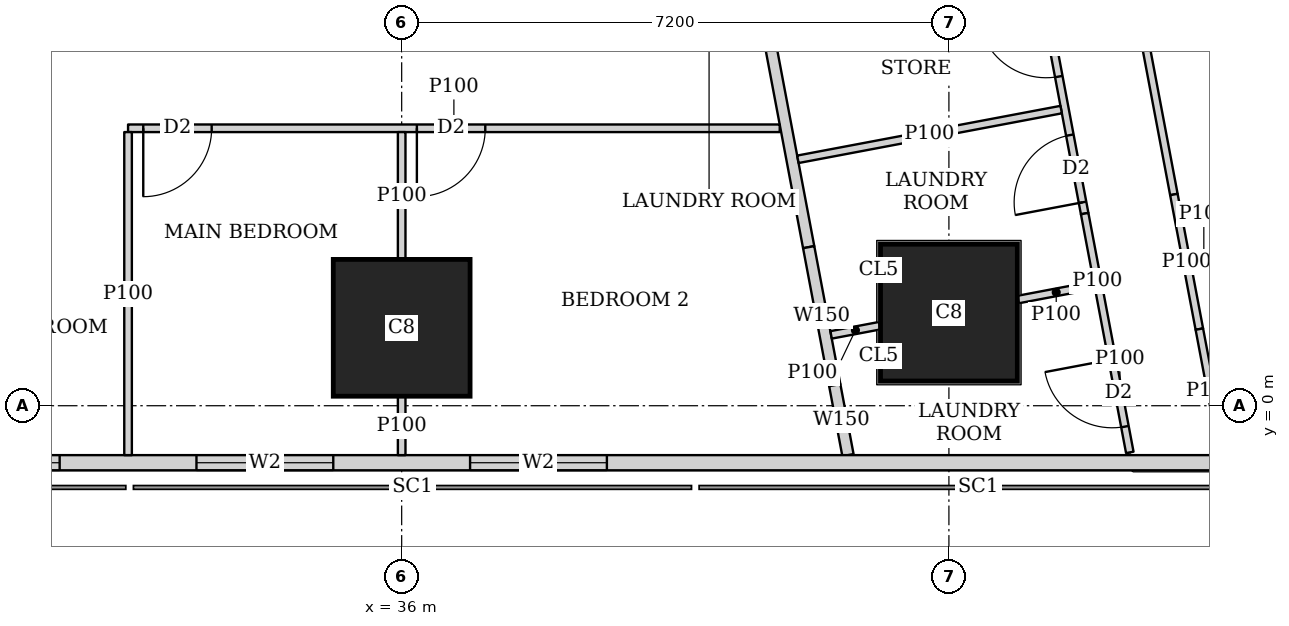
"""IFC4 building model, lengths in metres.
Left out: names, types, materials, properties, quantities, classifications, styles, units other than length and angle.
Written with IfcOpenShell. Run it as: python <this file> out.ifc"""

import sys

from ifc_helpers import new_model, si_unit, direction, frame, frame_2d, origin, origin_2d, place, context, subcontext, project, spatial, rectangle, extrude, element, fill, save


model = new_model("IFC4")
c1 = context("Model", 3, precision=1e-05, world=origin(), true_north=direction((0.0, 1.0)))
c2 = subcontext(c1, "Body", "Model", "MODEL_VIEW")
j1 = project(units=[si_unit("LENGTHUNIT", "METRE"), si_unit("PLANEANGLEUNIT", "RADIAN")], contexts=[c1])
p1 = place(None, origin())
s1 = spatial("IfcSite", under=j1, at=p1, CompositionType="ELEMENT")
p2 = place(p1, origin())
s2 = spatial("IfcBuilding", under=s1, at=p2, CompositionType="ELEMENT")
p3 = place(p2, frame((0.0, 0.0, 184.55)))
s3 = spatial("IfcBuildingStorey", under=s2, at=p3, CompositionType="ELEMENT", Elevation=184.55)
for number, where, z_axis, x_axis in (
    (1, (36.0, 1.025, 0.0), (0.0, 0.0, 1.0), (1.0, 0.0, 0.0)),
    (2, (43.2, 1.225, 0.0), (0.0, 0.0, 1.0), (1.0, 0.0, 0.0)),
):
    element("IfcColumn", number, at=place(p3, frame(where, z_axis=z_axis, x_axis=x_axis)), inside=s3, PredefinedType="COLUMN", context=c2, shape_type="SweptSolid", body=[
        extrude(rectangle(XDim=1.8, YDim=1.8, at=origin_2d()), origin(), (0.0, 0.0, 1.0), 3.75),
    ])
p4 = place(p3, frame((2.163, -0.75, 0.0), z_axis=(0.0, 0.0, 1.0), x_axis=(1.0, 0.0, 0.0)))
e3 = element("IfcWall", 3, at=p4, inside=s3, PredefinedType="SOLIDWALL", context=c2, shape_type="SweptSolid", body=[
    extrude(rectangle(XDim=45.628, YDim=0.2, at=frame_2d((22.814, 0.0))), origin(), (0.0, 0.0, 1.0), 3.45),
])
p5 = place(p4, frame((9.537, 0.0, 0.9)))
e4 = element("IfcOpeningElement", 4, at=p5, cuts=e3, PredefinedType="OPENING", context=c2, shape_type="SweptSolid", body=[
    extrude(rectangle(XDim=1.8, YDim=1.5, at=frame_2d((0.9, 0.75))), frame((0.0, 0.11, 0.0), z_axis=(0.0, -1.0, 0.0), x_axis=(1.0, 0.0, 0.0)), (0.0, 0.0, 1.0), 0.22),
])
p6 = place(p4, frame((13.137, 0.0, 0.9)))
e5 = element("IfcOpeningElement", 5, at=p6, cuts=e3, PredefinedType="OPENING", context=c2, shape_type="SweptSolid", body=[
    extrude(rectangle(XDim=1.8, YDim=1.5, at=frame_2d((0.9, 0.75))), frame((0.0, 0.11, 0.0), z_axis=(0.0, -1.0, 0.0), x_axis=(1.0, 0.0, 0.0)), (0.0, 0.0, 1.0), 0.22),
])
p7 = place(p4, frame((16.737, 0.0, 0.9)))
e6 = element("IfcOpeningElement", 6, at=p7, cuts=e3, PredefinedType="OPENING", context=c2, shape_type="SweptSolid", body=[
    extrude(rectangle(XDim=1.8, YDim=1.5, at=frame_2d((0.9, 0.75))), frame((0.0, 0.11, 0.0), z_axis=(0.0, -1.0, 0.0), x_axis=(1.0, 0.0, 0.0)), (0.0, 0.0, 1.0), 0.22),
])
p8 = place(p4, frame((20.337, 0.0, 0.9)))
e7 = element("IfcOpeningElement", 7, at=p8, cuts=e3, PredefinedType="OPENING", context=c2, shape_type="SweptSolid", body=[
    extrude(rectangle(XDim=1.8, YDim=1.5, at=frame_2d((0.9, 0.75))), frame((0.0, 0.11, 0.0), z_axis=(0.0, -1.0, 0.0), x_axis=(1.0, 0.0, 0.0)), (0.0, 0.0, 1.0), 0.22),
])
p9 = place(p4, frame((23.937, 0.0, 0.9)))
e8 = element("IfcOpeningElement", 8, at=p9, cuts=e3, PredefinedType="OPENING", context=c2, shape_type="SweptSolid", body=[
    extrude(rectangle(XDim=1.8, YDim=1.5, at=frame_2d((0.9, 0.75))), frame((0.0, 0.11, 0.0), z_axis=(0.0, -1.0, 0.0), x_axis=(1.0, 0.0, 0.0)), (0.0, 0.0, 1.0), 0.22),
])
p10 = place(p4, frame((27.537, 0.0, 0.9)))
e9 = element("IfcOpeningElement", 9, at=p10, cuts=e3, PredefinedType="OPENING", context=c2, shape_type="SweptSolid", body=[
    extrude(rectangle(XDim=1.8, YDim=1.5, at=frame_2d((0.9, 0.75))), frame((0.0, 0.11, 0.0), z_axis=(0.0, -1.0, 0.0), x_axis=(1.0, 0.0, 0.0)), (0.0, 0.0, 1.0), 0.22),
])
p11 = place(p4, frame((31.137, 0.0, 0.9)))
e10 = element("IfcOpeningElement", 10, at=p11, cuts=e3, PredefinedType="OPENING", context=c2, shape_type="SweptSolid", body=[
    extrude(rectangle(XDim=1.8, YDim=1.5, at=frame_2d((0.9, 0.75))), frame((0.0, 0.11, 0.0), z_axis=(0.0, -1.0, 0.0), x_axis=(1.0, 0.0, 0.0)), (0.0, 0.0, 1.0), 0.22),
])
p12 = place(p4, frame((34.737, 0.0, 0.9)))
e11 = element("IfcOpeningElement", 11, at=p12, cuts=e3, PredefinedType="OPENING", context=c2, shape_type="SweptSolid", body=[
    extrude(rectangle(XDim=1.8, YDim=1.5, at=frame_2d((0.9, 0.75))), frame((0.0, 0.11, 0.0), z_axis=(0.0, -1.0, 0.0), x_axis=(1.0, 0.0, 0.0)), (0.0, 0.0, 1.0), 0.22),
])
p13 = place(p3, frame((50.653, 2.703, 0.0), z_axis=(0.0, 0.0, 1.0), x_axis=(-0.185612026696, 0.982623109613, 0.0)))
e12 = element("IfcWall", 12, at=p13, inside=s3, PredefinedType="SOLIDWALL", context=c2, shape_type="SweptSolid", body=[
    extrude(rectangle(XDim=41.393, YDim=0.2, at=frame_2d((20.697, 0.0))), origin(), (0.0, 0.0, 1.0), 3.45),
])
p14 = place(p13, frame((1.633, 0.0, 0.9)))
e13 = element("IfcOpeningElement", 13, at=p14, cuts=e12, PredefinedType="OPENING", context=c2, shape_type="SweptSolid", body=[
    extrude(rectangle(XDim=1.8, YDim=1.5, at=frame_2d((0.9, 0.75))), frame((0.0, 0.11, 0.0), z_axis=(0.0, -1.0, 0.0), x_axis=(1.0, 0.0, 0.0)), (0.0, 0.0, 1.0), 0.22),
])
p15 = place(p13, frame((6.032, 0.0, 0.9)))
e14 = element("IfcOpeningElement", 14, at=p15, cuts=e12, PredefinedType="OPENING", context=c2, shape_type="SweptSolid", body=[
    extrude(rectangle(XDim=1.8, YDim=1.5, at=frame_2d((0.9, 0.75))), frame((0.0, 0.11, 0.0), z_axis=(0.0, -1.0, 0.0), x_axis=(1.0, 0.0, 0.0)), (0.0, 0.0, 1.0), 0.22),
])
p16 = place(p13, frame((9.848, 0.0, 0.9)))
e15 = element("IfcOpeningElement", 15, at=p16, cuts=e12, PredefinedType="OPENING", context=c2, shape_type="SweptSolid", body=[
    extrude(rectangle(XDim=1.8, YDim=1.5, at=frame_2d((0.9, 0.75))), frame((0.0, 0.11, 0.0), z_axis=(0.0, -1.0, 0.0), x_axis=(1.0, 0.0, 0.0)), (0.0, 0.0, 1.0), 0.22),
])
p17 = place(p13, frame((13.664, 0.0, 0.9)))
e16 = element("IfcOpeningElement", 16, at=p17, cuts=e12, PredefinedType="OPENING", context=c2, shape_type="SweptSolid", body=[
    extrude(rectangle(XDim=1.8, YDim=1.5, at=frame_2d((0.9, 0.75))), frame((0.0, 0.11, 0.0), z_axis=(0.0, -1.0, 0.0), x_axis=(1.0, 0.0, 0.0)), (0.0, 0.0, 1.0), 0.22),
])
p18 = place(p13, frame((17.481, 0.0, 0.9)))
e17 = element("IfcOpeningElement", 17, at=p18, cuts=e12, PredefinedType="OPENING", context=c2, shape_type="SweptSolid", body=[
    extrude(rectangle(XDim=1.8, YDim=1.5, at=frame_2d((0.9, 0.75))), frame((0.0, 0.11, 0.0), z_axis=(0.0, -1.0, 0.0), x_axis=(1.0, 0.0, 0.0)), (0.0, 0.0, 1.0), 0.22),
])
p19 = place(p13, frame((21.297, 0.0, 0.9)))
e18 = element("IfcOpeningElement", 18, at=p19, cuts=e12, PredefinedType="OPENING", context=c2, shape_type="SweptSolid", body=[
    extrude(rectangle(XDim=1.8, YDim=1.5, at=frame_2d((0.9, 0.75))), frame((0.0, 0.11, 0.0), z_axis=(0.0, -1.0, 0.0), x_axis=(1.0, 0.0, 0.0)), (0.0, 0.0, 1.0), 0.22),
])
p20 = place(p13, frame((25.113, 0.0, 0.9)))
e19 = element("IfcOpeningElement", 19, at=p20, cuts=e12, PredefinedType="OPENING", context=c2, shape_type="SweptSolid", body=[
    extrude(rectangle(XDim=1.8, YDim=1.5, at=frame_2d((0.9, 0.75))), frame((0.0, 0.11, 0.0), z_axis=(0.0, -1.0, 0.0), x_axis=(1.0, 0.0, 0.0)), (0.0, 0.0, 1.0), 0.22),
])
p21 = place(p13, frame((28.93, 0.0, 0.9)))
e20 = element("IfcOpeningElement", 20, at=p21, cuts=e12, PredefinedType="OPENING", context=c2, shape_type="SweptSolid", body=[
    extrude(rectangle(XDim=1.8, YDim=1.5, at=frame_2d((0.9, 0.75))), frame((0.0, 0.11, 0.0), z_axis=(0.0, -1.0, 0.0), x_axis=(1.0, 0.0, 0.0)), (0.0, 0.0, 1.0), 0.22),
])
p22 = place(p13, frame((32.746, 0.0, 0.9)))
e21 = element("IfcOpeningElement", 21, at=p22, cuts=e12, PredefinedType="OPENING", context=c2, shape_type="SweptSolid", body=[
    extrude(rectangle(XDim=1.8, YDim=1.5, at=frame_2d((0.9, 0.75))), frame((0.0, 0.11, 0.0), z_axis=(0.0, -1.0, 0.0), x_axis=(1.0, 0.0, 0.0)), (0.0, 0.0, 1.0), 0.22),
])
p23 = place(p13, frame((36.481, 0.0, 0.9)))
e22 = element("IfcOpeningElement", 22, at=p23, cuts=e12, PredefinedType="OPENING", context=c2, shape_type="SweptSolid", body=[
    extrude(rectangle(XDim=1.8, YDim=1.5, at=frame_2d((0.9, 0.75))), frame((0.0, 0.11, 0.0), z_axis=(0.0, -1.0, 0.0), x_axis=(1.0, 0.0, 0.0)), (0.0, 0.0, 1.0), 0.22),
])
p24 = place(p3, frame((33.623, 43.022, 0.0), z_axis=(0.0, 0.0, 1.0), x_axis=(0.185596841028, -0.98262597798, 0.0)))
e23 = element("IfcWall", 23, at=p24, inside=s3, PredefinedType="SOLIDWALL", context=c2, shape_type="SweptSolid", body=[
    extrude(rectangle(XDim=41.66, YDim=0.15, at=frame_2d((20.83, 0.0))), origin(), (0.0, 0.0, 1.0), 2.45),
])
p25 = place(p24, frame((8.034, 0.0, 0.0)))
e24 = element("IfcOpeningElement", 24, at=p25, cuts=e23, PredefinedType="OPENING", context=c2, shape_type="SweptSolid", body=[
    extrude(rectangle(XDim=1.0, YDim=2.1, at=frame_2d((0.5, 1.05))), frame((0.0, 0.085, 0.0), z_axis=(0.0, -1.0, 0.0), x_axis=(1.0, 0.0, 0.0)), (0.0, 0.0, 1.0), 0.17),
])
p26 = place(p24, frame((12.611, 0.0, 0.0)))
e25 = element("IfcOpeningElement", 25, at=p26, cuts=e23, PredefinedType="OPENING", context=c2, shape_type="SweptSolid", body=[
    extrude(rectangle(XDim=1.0, YDim=2.1, at=frame_2d((0.5, 1.05))), frame((0.0, 0.085, 0.0), z_axis=(0.0, -1.0, 0.0), x_axis=(1.0, 0.0, 0.0)), (0.0, 0.0, 1.0), 0.17),
])
p27 = place(p24, frame((20.242, 0.0, 0.0)))
e26 = element("IfcOpeningElement", 26, at=p27, cuts=e23, PredefinedType="OPENING", context=c2, shape_type="SweptSolid", body=[
    extrude(rectangle(XDim=1.0, YDim=2.1, at=frame_2d((0.5, 1.05))), frame((0.0, 0.085, 0.0), z_axis=(0.0, -1.0, 0.0), x_axis=(1.0, 0.0, 0.0)), (0.0, 0.0, 1.0), 0.17),
])
p28 = place(p24, frame((31.206, 0.0, 0.0)))
e27 = element("IfcOpeningElement", 27, at=p28, cuts=e23, PredefinedType="OPENING", context=c2, shape_type="SweptSolid", body=[
    extrude(rectangle(XDim=1.0, YDim=2.1, at=frame_2d((0.5, 1.05))), frame((0.0, 0.085, 0.0), z_axis=(0.0, -1.0, 0.0), x_axis=(1.0, 0.0, 0.0)), (0.0, 0.0, 1.0), 0.17),
])
p29 = place(p3, frame((41.355, 2.086, 0.0), z_axis=(0.0, 0.0, 1.0), x_axis=(0.185708872674, -0.982604811005, 0.0)))
e28 = element("IfcWall", 28, at=p29, inside=s3, PredefinedType="SOLIDWALL", context=c2, shape_type="SweptSolid", body=[
    extrude(rectangle(XDim=1.847, YDim=0.15, at=frame_2d((0.924, 0.0))), origin(), (0.0, 0.0, 1.0), 2.05),
])
p30 = place(p3, frame((41.698, 0.271, 0.0), z_axis=(0.0, 0.0, 1.0), x_axis=(0.185735329995, -0.982599810295, 0.0)))
e29 = element("IfcWall", 29, at=p30, inside=s3, PredefinedType="SOLIDWALL", context=c2, shape_type="SweptSolid", body=[
    extrude(rectangle(XDim=0.937, YDim=0.15, at=frame_2d((0.469, 0.0))), origin(), (0.0, 0.0, 1.0), 3.45),
])
p31 = place(p3, frame((40.974, 3.65, 0.0), z_axis=(0.0, 0.0, 1.0), x_axis=(-1.0, 0.0, 0.0)))
e30 = element("IfcWall", 30, at=p31, inside=s3, PredefinedType="PARTITIONING", context=c2, shape_type="SweptSolid", body=[
    extrude(rectangle(XDim=8.574, YDim=0.1, at=frame_2d((4.287, 0.0))), origin(), (0.0, 0.0, 1.0), 3.45),
])
p32 = place(p31, frame((7.474, 0.0, 0.0)))
e31 = element("IfcOpeningElement", 31, at=p32, cuts=e30, PredefinedType="OPENING", context=c2, shape_type="SweptSolid", body=[
    extrude(rectangle(XDim=0.9, YDim=2.1, at=frame_2d((0.45, 1.05))), frame((0.0, 0.06, 0.0), z_axis=(0.0, -1.0, 0.0), x_axis=(1.0, 0.0, 0.0)), (0.0, 0.0, 1.0), 0.12),
])
p33 = place(p31, frame((3.874, 0.0, 0.0)))
e32 = element("IfcOpeningElement", 32, at=p33, cuts=e30, PredefinedType="OPENING", context=c2, shape_type="SweptSolid", body=[
    extrude(rectangle(XDim=0.9, YDim=2.1, at=frame_2d((0.45, 1.05))), frame((0.0, 0.06, 0.0), z_axis=(0.0, -1.0, 0.0), x_axis=(1.0, 0.0, 0.0)), (0.0, 0.0, 1.0), 0.12),
])
p34 = place(p3, frame((32.4, -0.65, 0.0), z_axis=(0.0, 0.0, 1.0), x_axis=(0.0, 1.0, 0.0)))
e33 = element("IfcWall", 33, at=p34, inside=s3, PredefinedType="PARTITIONING", context=c2, shape_type="SweptSolid", body=[
    extrude(rectangle(XDim=4.25, YDim=0.1, at=frame_2d((2.125, 0.0))), origin(), (0.0, 0.0, 1.0), 2.05),
])
p35 = place(p3, frame((36.0, -0.65, 0.0), z_axis=(0.0, 0.0, 1.0), x_axis=(0.0, 1.0, 0.0)))
e34 = element("IfcWall", 34, at=p35, inside=s3, PredefinedType="PARTITIONING", context=c2, shape_type="SweptSolid", body=[
    extrude(rectangle(XDim=0.774, YDim=0.1, at=frame_2d((0.387, 0.0))), origin(), (0.0, 0.0, 1.0), 3.45),
])
p36 = place(p3, frame((36.0, 1.926, 0.0), z_axis=(0.0, 0.0, 1.0), x_axis=(0.0, 1.0, 0.0)))
e35 = element("IfcWall", 35, at=p36, inside=s3, PredefinedType="PARTITIONING", context=c2, shape_type="SweptSolid", body=[
    extrude(rectangle(XDim=1.674, YDim=0.1, at=frame_2d((0.837, 0.0))), origin(), (0.0, 0.0, 1.0), 3.45),
])
p37 = place(p3, frame((44.727, 10.366, 0.0), z_axis=(0.0, 0.0, 1.0), x_axis=(0.185578957652, -0.982629355595, 0.0)))
e36 = element("IfcWall", 36, at=p37, inside=s3, PredefinedType="PARTITIONING", context=c2, shape_type="SweptSolid", body=[
    extrude(rectangle(XDim=7.721, YDim=0.1, at=frame_2d((3.86, 0.0))), origin(), (0.0, 0.0, 1.0), 3.45),
])
p38 = place(p37, frame((0.151, 0.0, 0.0)))
e37 = element("IfcOpeningElement", 37, at=p38, cuts=e36, PredefinedType="OPENING", context=c2, shape_type="SweptSolid", body=[
    extrude(rectangle(XDim=0.9, YDim=2.1, at=frame_2d((0.45, 1.05))), frame((0.0, 0.06, 0.0), z_axis=(0.0, -1.0, 0.0), x_axis=(1.0, 0.0, 0.0)), (0.0, 0.0, 1.0), 0.12),
])
p39 = place(p37, frame((3.806, 0.0, 0.0)))
e38 = element("IfcOpeningElement", 38, at=p39, cuts=e36, PredefinedType="OPENING", context=c2, shape_type="SweptSolid", body=[
    extrude(rectangle(XDim=0.9, YDim=2.1, at=frame_2d((0.45, 1.05))), frame((0.0, 0.06, 0.0), z_axis=(0.0, -1.0, 0.0), x_axis=(1.0, 0.0, 0.0)), (0.0, 0.0, 1.0), 0.12),
])
p40 = place(p3, frame((46.16, 2.779, 0.0), z_axis=(0.0, 0.0, 1.0), x_axis=(0.18597295662, -0.982554863306, 0.0)))
e39 = element("IfcWall", 39, at=p40, inside=s3, PredefinedType="PARTITIONING", context=c2, shape_type="SweptSolid", body=[
    extrude(rectangle(XDim=1.802, YDim=0.1, at=frame_2d((0.901, 0.0))), origin(), (0.0, 0.0, 1.0), 2.05),
])
p41 = place(p3, frame((46.495, 1.008, 0.0), z_axis=(0.0, 0.0, 1.0), x_axis=(0.185535059532, -0.982637645159, 0.0)))
e40 = element("IfcWall", 40, at=p41, inside=s3, PredefinedType="PARTITIONING", context=c2, shape_type="SweptSolid", body=[
    extrude(rectangle(XDim=1.644, YDim=0.1, at=frame_2d((0.822, 0.0))), origin(), (0.0, 0.0, 1.0), 3.45),
])
p42 = place(p3, frame((43.999, 7.755, 0.0), z_axis=(0.0, 0.0, 1.0), x_axis=(0.185565904578, -0.982631820703, 0.0)))
e41 = element("IfcWall", 41, at=p42, inside=s3, PredefinedType="PARTITIONING", context=c2, shape_type="SweptSolid", body=[
    extrude(rectangle(XDim=5.319, YDim=0.1, at=frame_2d((2.66, 0.0))), origin(), (0.0, 0.0, 1.0), 3.45),
])
p43 = place(p42, frame((1.0, 0.0, 0.0)))
e42 = element("IfcOpeningElement", 42, at=p43, cuts=e41, PredefinedType="OPENING", context=c2, shape_type="SweptSolid", body=[
    extrude(rectangle(XDim=0.9, YDim=2.1, at=frame_2d((0.45, 1.05))), frame((0.0, 0.06, 0.0), z_axis=(0.0, -1.0, 0.0), x_axis=(1.0, 0.0, 0.0)), (0.0, 0.0, 1.0), 0.12),
])
p44 = place(p42, frame((4.269, 0.0, 0.0)))
e43 = element("IfcOpeningElement", 43, at=p44, cuts=e41, PredefinedType="OPENING", context=c2, shape_type="SweptSolid", body=[
    extrude(rectangle(XDim=0.9, YDim=2.1, at=frame_2d((0.45, 1.05))), frame((0.0, 0.06, 0.0), z_axis=(0.0, -1.0, 0.0), x_axis=(1.0, 0.0, 0.0)), (0.0, 0.0, 1.0), 0.12),
])
p45 = place(p42, frame((2.585, 0.0, 0.0)))
e44 = element("IfcOpeningElement", 44, at=p45, cuts=e41, PredefinedType="OPENING", context=c2, shape_type="SweptSolid", body=[
    extrude(rectangle(XDim=0.9, YDim=2.1, at=frame_2d((0.45, 1.05))), frame((0.0, 0.06, 0.0), z_axis=(0.0, -1.0, 0.0), x_axis=(1.0, 0.0, 0.0)), (0.0, 0.0, 1.0), 0.12),
])
p46 = place(p3, frame((44.986, 2.528, 0.0), z_axis=(0.0, 0.0, 1.0), x_axis=(0.18584218627, -0.982579605835, 0.0)))
e45 = element("IfcWall", 45, at=p46, inside=s3, PredefinedType="PARTITIONING", context=c2, shape_type="SweptSolid", body=[
    extrude(rectangle(XDim=1.802, YDim=0.1, at=frame_2d((0.901, 0.0))), origin(), (0.0, 0.0, 1.0), 2.05),
])
p47 = place(p3, frame((45.321, 0.757, 0.0), z_axis=(0.0, 0.0, 1.0), x_axis=(0.185640562635, -0.982617718904, 0.0)))
e46 = element("IfcWall", 46, at=p47, inside=s3, PredefinedType="PARTITIONING", context=c2, shape_type="SweptSolid", body=[
    extrude(rectangle(XDim=1.395, YDim=0.1, at=frame_2d((0.698, 0.0))), origin(), (0.0, 0.0, 1.0), 3.45),
])
p48 = place(p47, frame((0.15, 0.0, 0.0)))
e47 = element("IfcOpeningElement", 47, at=p48, cuts=e46, PredefinedType="OPENING", context=c2, shape_type="SweptSolid", body=[
    extrude(rectangle(XDim=0.9, YDim=2.1, at=frame_2d((0.45, 1.05))), frame((0.0, 0.06, 0.0), z_axis=(0.0, -1.0, 0.0), x_axis=(1.0, 0.0, 0.0)), (0.0, 0.0, 1.0), 0.12),
])
p49 = place(p3, frame((46.738, 2.006, 0.0), z_axis=(0.0, 0.0, 1.0), x_axis=(-0.982820466874, -0.184564161994, 0.0)))
e48 = element("IfcWall", 48, at=p49, inside=s3, PredefinedType="PARTITIONING", context=c2, shape_type="SweptSolid", body=[
    extrude(rectangle(XDim=0.374, YDim=0.1, at=frame_2d((0.187, 0.0))), origin(), (0.0, 0.0, 1.0), 2.05),
])
p50 = place(p3, frame((45.114, 1.587, 0.0), z_axis=(0.0, 0.0, 1.0), x_axis=(-0.982567886437, -0.185904138047, 0.0)))
e49 = element("IfcWall", 49, at=p50, inside=s3, PredefinedType="PARTITIONING", context=c2, shape_type="SweptSolid", body=[
    extrude(rectangle(XDim=1.022, YDim=0.1, at=frame_2d((0.511, 0.0))), origin(), (0.0, 0.0, 1.0), 2.05),
])
p51 = place(p3, frame((42.29, 1.053, 0.0), z_axis=(0.0, 0.0, 1.0), x_axis=(-0.982573945355, -0.185872111707, 0.0)))
e50 = element("IfcWall", 50, at=p51, inside=s3, PredefinedType="PARTITIONING", context=c2, shape_type="SweptSolid", body=[
    extrude(rectangle(XDim=0.652, YDim=0.1, at=frame_2d((0.326, 0.0))), origin(), (0.0, 0.0, 1.0), 2.05),
])
p52 = place(p3, frame((44.677, 3.896, 0.0), z_axis=(0.0, 0.0, 1.0), x_axis=(-0.982638553676, -0.185530247748, 0.0)))
e51 = element("IfcWall", 51, at=p52, inside=s3, PredefinedType="PARTITIONING", context=c2, shape_type="SweptSolid", body=[
    extrude(rectangle(XDim=3.525, YDim=0.1, at=frame_2d((1.763, 0.0))), origin(), (0.0, 0.0, 1.0), 3.45),
])
p53 = place(p10, origin())
e52 = element("IfcWindow", 52, at=p53, inside=s3, PartitioningType="SINGLE_PANEL", PredefinedType="WINDOW", context=c2, shape_type="SweptSolid", body=[
    extrude(rectangle(XDim=1.8, YDim=1.5, at=frame_2d((0.9, 0.75))), frame((0.0, 0.03, 0.0), z_axis=(0.0, -1.0, 0.0), x_axis=(1.0, 0.0, 0.0)), (0.0, 0.0, 1.0), 0.06),
])
fill(e9, e52)
p54 = place(p11, origin())
e53 = element("IfcWindow", 53, at=p54, inside=s3, PartitioningType="SINGLE_PANEL", PredefinedType="WINDOW", context=c2, shape_type="SweptSolid", body=[
    extrude(rectangle(XDim=1.8, YDim=1.5, at=frame_2d((0.9, 0.75))), frame((0.0, 0.03, 0.0), z_axis=(0.0, -1.0, 0.0), x_axis=(1.0, 0.0, 0.0)), (0.0, 0.0, 1.0), 0.06),
])
fill(e10, e53)
p55 = place(p12, origin())
e54 = element("IfcWindow", 54, at=p55, inside=s3, PartitioningType="SINGLE_PANEL", PredefinedType="WINDOW", context=c2, shape_type="SweptSolid", body=[
    extrude(rectangle(XDim=1.8, YDim=1.5, at=frame_2d((0.9, 0.75))), frame((0.0, 0.03, 0.0), z_axis=(0.0, -1.0, 0.0), x_axis=(1.0, 0.0, 0.0)), (0.0, 0.0, 1.0), 0.06),
])
fill(e11, e54)
p56 = place(p32, origin())
e55 = element("IfcDoor", 55, at=p56, inside=s3, OperationType="SINGLE_SWING_RIGHT", PredefinedType="DOOR", context=c2, shape_type="SweptSolid", body=[
    extrude(rectangle(XDim=0.9, YDim=2.1, at=frame_2d((0.45, 1.05))), frame((0.0, 0.025, 0.0), z_axis=(0.0, -1.0, 0.0), x_axis=(1.0, 0.0, 0.0)), (0.0, 0.0, 1.0), 0.05),
])
fill(e31, e55)
p57 = place(p33, origin())
e56 = element("IfcDoor", 56, at=p57, inside=s3, OperationType="SINGLE_SWING_RIGHT", PredefinedType="DOOR", context=c2, shape_type="SweptSolid", body=[
    extrude(rectangle(XDim=0.9, YDim=2.1, at=frame_2d((0.45, 1.05))), frame((0.0, 0.025, 0.0), z_axis=(0.0, -1.0, 0.0), x_axis=(1.0, 0.0, 0.0)), (0.0, 0.0, 1.0), 0.05),
])
fill(e32, e56)
p58 = place(p44, origin())
e57 = element("IfcDoor", 57, at=p58, inside=s3, OperationType="SINGLE_SWING_LEFT", PredefinedType="DOOR", context=c2, shape_type="SweptSolid", body=[
    extrude(rectangle(XDim=0.9, YDim=2.1, at=frame_2d((0.45, 1.05))), frame((0.0, 0.025, 0.0), z_axis=(0.0, -1.0, 0.0), x_axis=(1.0, 0.0, 0.0)), (0.0, 0.0, 1.0), 0.05),
])
fill(e43, e57)
p59 = place(p48, origin())
e58 = element("IfcDoor", 58, at=p59, inside=s3, OperationType="SINGLE_SWING_RIGHT", PredefinedType="DOOR", context=c2, shape_type="SweptSolid", body=[
    extrude(rectangle(XDim=0.9, YDim=2.1, at=frame_2d((0.45, 1.05))), frame((0.0, 0.025, 0.0), z_axis=(0.0, -1.0, 0.0), x_axis=(1.0, 0.0, 0.0)), (0.0, 0.0, 1.0), 0.05),
])
fill(e47, e58)
p60 = place(p45, origin())
e59 = element("IfcDoor", 59, at=p60, inside=s3, OperationType="SINGLE_SWING_RIGHT", PredefinedType="DOOR", context=c2, shape_type="SweptSolid", body=[
    extrude(rectangle(XDim=0.9, YDim=2.1, at=frame_2d((0.45, 1.05))), frame((0.0, 0.025, 0.0), z_axis=(0.0, -1.0, 0.0), x_axis=(1.0, 0.0, 0.0)), (0.0, 0.0, 1.0), 0.05),
])
fill(e44, e59)
save(model, sys.argv[1])
